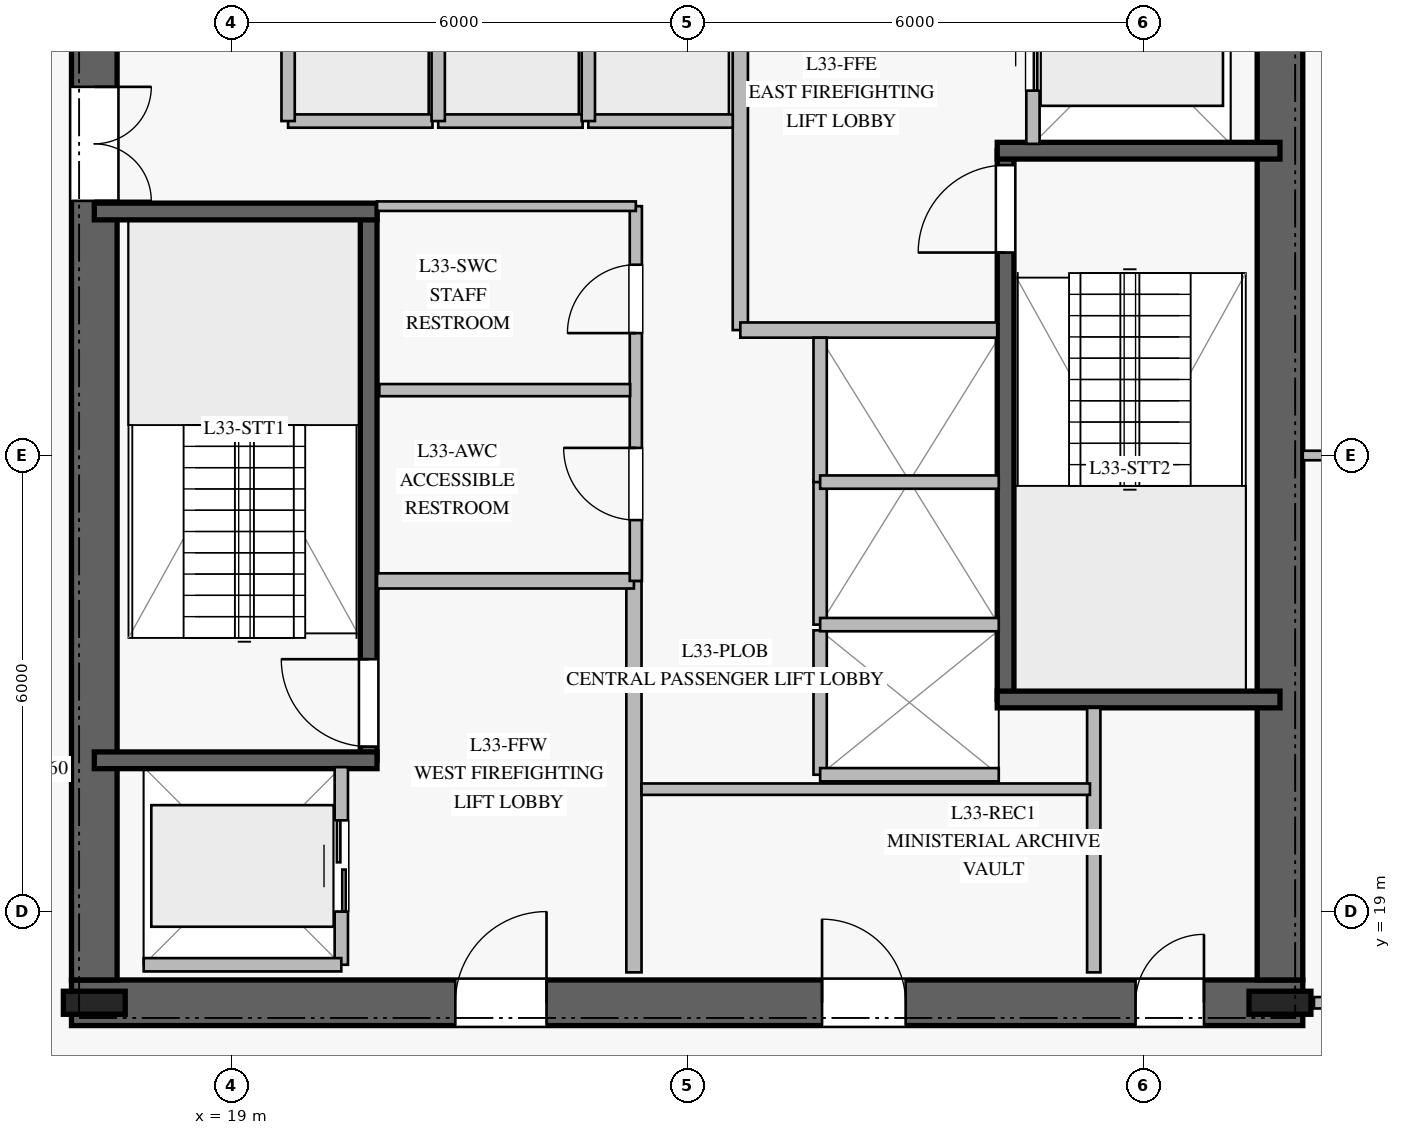
"""IFC4 building model, lengths in metres.
Left out: names, types, materials, properties, quantities, classifications, styles, units other than length and angle.
Written with IfcOpenShell. Run it as: python <this file> out.ifc"""

import sys

from ifc_helpers import new_model, si_unit, direction, frame, frame_2d, origin, origin_2d, place, context, subcontext, project, spatial, rectangle, i_section, extrude, element, fill, save


model = new_model("IFC4")
c1 = context("Model", 3, precision=1e-05, world=origin(), true_north=direction((0.0, 1.0)))
c2 = subcontext(c1, "Body", "Model", "MODEL_VIEW")
j1 = project(units=[si_unit("LENGTHUNIT", "METRE"), si_unit("PLANEANGLEUNIT", "RADIAN")], contexts=[c1])
p1 = place(None, origin())
s1 = spatial("IfcSite", under=j1, at=p1, CompositionType="ELEMENT")
p2 = place(p1, origin())
s2 = spatial("IfcBuilding", under=s1, at=p2, CompositionType="ELEMENT")
p3 = place(p2, frame((0.0, 0.0, 138.4)))
s3 = spatial("IfcBuildingStorey", under=s2, at=p3, CompositionType="ELEMENT", Elevation=138.4)
p4 = place(p3, frame((16.9, 17.8, 0.0), z_axis=(0.0, 0.0, 1.0), x_axis=(1.0, 0.0, 0.0)))
e1 = element("IfcWall", 1, at=p4, inside=s3, PredefinedType="SHEAR", context=c2, shape_type="SweptSolid", body=[
    extrude(rectangle(XDim=16.2, YDim=0.6, at=frame_2d((8.1, 0.0))), origin(), (0.0, 0.0, 1.0), 3.76),
])
p5 = place(p4, frame((5.05, 0.0, 0.0)))
e2 = element("IfcOpeningElement", 2, at=p5, cuts=e1, PredefinedType="OPENING", context=c2, shape_type="SweptSolid", body=[
    extrude(rectangle(XDim=1.2, YDim=2.25, at=frame_2d((0.6, 1.125))), frame((0.0, 0.31, 0.0), z_axis=(0.0, -1.0, 0.0), x_axis=(1.0, 0.0, 0.0)), (0.0, 0.0, 1.0), 0.62),
])
p6 = place(p4, frame((14.0, 0.0, 0.0)))
e3 = element("IfcOpeningElement", 3, at=p6, cuts=e1, PredefinedType="OPENING", context=c2, shape_type="SweptSolid", body=[
    extrude(rectangle(XDim=0.9, YDim=2.1, at=frame_2d((0.45, 1.05))), frame((0.0, 0.31, 0.0), z_axis=(0.0, -1.0, 0.0), x_axis=(1.0, 0.0, 0.0)), (0.0, 0.0, 1.0), 0.62),
])
p7 = place(p4, frame((9.875, 0.0, 0.0)))
e4 = element("IfcOpeningElement", 4, at=p7, cuts=e1, PredefinedType="OPENING", context=c2, shape_type="SweptSolid", body=[
    extrude(rectangle(XDim=1.1, YDim=2.2, at=frame_2d((0.55, 1.1))), frame((0.0, 0.31, 0.0), z_axis=(0.0, -1.0, 0.0), x_axis=(1.0, 0.0, 0.0)), (0.0, 0.0, 1.0), 0.62),
])
p8 = place(p3, frame((17.2, 31.9, 0.0), z_axis=(0.0, 0.0, 1.0), x_axis=(0.0, -1.0, 0.0)))
e5 = element("IfcWall", 5, at=p8, inside=s3, PredefinedType="SHEAR", context=c2, shape_type="SweptSolid", body=[
    extrude(rectangle(XDim=13.8, YDim=0.6, at=frame_2d((6.9, 0.0))), origin(), (0.0, 0.0, 1.0), 3.76),
])
p9 = place(p8, frame((2.05, 0.0, 0.0)))
e6 = element("IfcOpeningElement", 6, at=p9, cuts=e5, PredefinedType="OPENING", context=c2, shape_type="SweptSolid", body=[
    extrude(rectangle(XDim=1.5, YDim=2.2, at=frame_2d((0.75, 1.1))), frame((0.0, 0.31, 0.0), z_axis=(0.0, -1.0, 0.0), x_axis=(1.0, 0.0, 0.0)), (0.0, 0.0, 1.0), 0.62),
])
p10 = place(p3, frame((32.8, 18.1, 0.0), z_axis=(0.0, 0.0, 1.0), x_axis=(0.0, 1.0, 0.0)))
e7 = element("IfcWall", 7, at=p10, inside=s3, PredefinedType="SHEAR", context=c2, shape_type="SweptSolid", body=[
    extrude(rectangle(XDim=13.8, YDim=0.6, at=frame_2d((6.9, 0.0))), origin(), (0.0, 0.0, 1.0), 3.76),
])
for number, where, z_axis, x_axis in (
    (8, (17.2, 17.8, 0.0), (0.0, 0.0, 1.0), (1.0, 0.0, 0.0)),
    (9, (32.8, 17.8, 0.0), (0.0, 0.0, 1.0), (1.0, 0.0, 0.0)),
):
    element("IfcColumn", number, at=place(p3, frame(where, z_axis=z_axis, x_axis=x_axis)), inside=s3, PredefinedType="COLUMN", context=c2, shape_type="SweptSolid", body=[
        extrude(i_section(OverallWidth=0.303, OverallDepth=0.814, WebThickness=0.021, FlangeThickness=0.04, at=origin_2d()), origin(), (0.0, 0.0, 1.0), 4.0),
    ])
p11 = place(p3, frame((20.81, 20.99, 0.0), z_axis=(0.0, 0.0, 1.0), x_axis=(0.0, 1.0, 0.0)))
e10 = element("IfcWall", 10, at=p11, inside=s3, PredefinedType="SOLIDWALL", context=c2, shape_type="SweptSolid", body=[
    extrude(rectangle(XDim=7.22, YDim=0.22, at=frame_2d((3.61, 0.0))), origin(), (0.0, 0.0, 1.0), 3.76),
])
p12 = place(p11, frame((0.18, 0.0, 0.0)))
e11 = element("IfcOpeningElement", 11, at=p12, cuts=e10, PredefinedType="OPENING", context=c2, shape_type="SweptSolid", body=[
    extrude(rectangle(XDim=1.15, YDim=2.2, at=frame_2d((0.575, 1.1))), frame((0.0, 0.12, 0.0), z_axis=(0.0, -1.0, 0.0), x_axis=(1.0, 0.0, 0.0)), (0.0, 0.0, 1.0), 0.24),
])
for number, where, z_axis, x_axis in (
    (12, (17.2, 20.99, 0.0), (0.0, 0.0, 1.0), (1.0, 0.0, 0.0)),
    (13, (17.2, 28.21, 0.0), (0.0, 0.0, 1.0), (1.0, 0.0, 0.0)),
):
    element("IfcWall", number, at=place(p3, frame(where, z_axis=z_axis, x_axis=x_axis)), inside=s3, PredefinedType="SOLIDWALL", context=c2, shape_type="SweptSolid", body=[
        extrude(rectangle(XDim=3.72, YDim=0.22, at=frame_2d((1.86, 0.0))), origin(), (0.0, 0.0, 1.0), 3.76),
    ])
p13 = place(p3, frame((29.19, 21.79, 0.0), z_axis=(0.0, 0.0, 1.0), x_axis=(0.0, 1.0, 0.0)))
e14 = element("IfcWall", 14, at=p13, inside=s3, PredefinedType="SOLIDWALL", context=c2, shape_type="SweptSolid", body=[
    extrude(rectangle(XDim=7.22, YDim=0.22, at=frame_2d((3.61, 0.0))), origin(), (0.0, 0.0, 1.0), 3.76),
])
p14 = place(p13, frame((5.88, 0.0, 0.0)))
e15 = element("IfcOpeningElement", 15, at=p14, cuts=e14, PredefinedType="OPENING", context=c2, shape_type="SweptSolid", body=[
    extrude(rectangle(XDim=1.15, YDim=2.2, at=frame_2d((0.575, 1.1))), frame((0.0, 0.12, 0.0), z_axis=(0.0, -1.0, 0.0), x_axis=(1.0, 0.0, 0.0)), (0.0, 0.0, 1.0), 0.24),
])
for number, where, z_axis, x_axis in (
    (16, (29.08, 21.79, 0.0), (0.0, 0.0, 1.0), (1.0, 0.0, 0.0)),
    (17, (29.08, 29.01, 0.0), (0.0, 0.0, 1.0), (1.0, 0.0, 0.0)),
):
    element("IfcWall", number, at=place(p3, frame(where, z_axis=z_axis, x_axis=x_axis)), inside=s3, PredefinedType="SOLIDWALL", context=c2, shape_type="SweptSolid", body=[
        extrude(rectangle(XDim=3.72, YDim=0.22, at=frame_2d((1.86, 0.0))), origin(), (0.0, 0.0, 1.0), 3.76),
    ])
p15 = place(p3, frame((24.3, 18.2, 0.0), z_axis=(0.0, 0.0, 1.0), x_axis=(0.0, 1.0, 0.0)))
e18 = element("IfcWall", 18, at=p15, inside=s3, PredefinedType="PARTITIONING", context=c2, shape_type="SweptSolid", body=[
    extrude(rectangle(XDim=5.15, YDim=0.2, at=frame_2d((2.575, 0.0))), origin(), (0.0, 0.0, 1.0), 3.76),
])
p16 = place(p3, frame((20.92, 23.35, 0.0), z_axis=(0.0, 0.0, 1.0), x_axis=(1.0, 0.0, 0.0)))
e19 = element("IfcWall", 19, at=p16, inside=s3, PredefinedType="PARTITIONING", context=c2, shape_type="SweptSolid", body=[
    extrude(rectangle(XDim=3.38, YDim=0.2, at=frame_2d((1.69, 0.0))), origin(), (0.0, 0.0, 1.0), 3.76),
])
p17 = place(p3, frame((25.7, 26.65, 0.0), z_axis=(0.0, 0.0, 1.0), x_axis=(0.0, 1.0, 0.0)))
e20 = element("IfcWall", 20, at=p17, inside=s3, PredefinedType="PARTITIONING", context=c2, shape_type="SweptSolid", body=[
    extrude(rectangle(XDim=5.15, YDim=0.2, at=frame_2d((2.575, 0.0))), origin(), (0.0, 0.0, 1.0), 3.76),
])
p18 = place(p3, frame((25.7, 26.65, 0.0), z_axis=(0.0, 0.0, 1.0), x_axis=(1.0, 0.0, 0.0)))
e21 = element("IfcWall", 21, at=p18, inside=s3, PredefinedType="PARTITIONING", context=c2, shape_type="SweptSolid", body=[
    extrude(rectangle(XDim=3.38, YDim=0.2, at=frame_2d((1.69, 0.0))), origin(), (0.0, 0.0, 1.0), 3.76),
])
p19 = place(p3, frame((24.325, 23.35, 0.0), z_axis=(0.0, 0.0, 1.0), x_axis=(0.0, 1.0, 0.0)))
e22 = element("IfcWall", 22, at=p19, inside=s3, PredefinedType="PLUMBINGWALL", context=c2, shape_type="SweptSolid", body=[
    extrude(rectangle(XDim=4.93, YDim=0.16, at=frame_2d((2.465, 0.0))), origin(), (0.0, 0.0, 1.0), 3.76),
])
p20 = place(p19, frame((0.8, 0.0, 0.0)))
e23 = element("IfcOpeningElement", 23, at=p20, cuts=e22, PredefinedType="OPENING", context=c2, shape_type="SweptSolid", body=[
    extrude(rectangle(XDim=0.95, YDim=2.1, at=frame_2d((0.475, 1.05))), frame((0.0, 0.09, 0.0), z_axis=(0.0, -1.0, 0.0), x_axis=(1.0, 0.0, 0.0)), (0.0, 0.0, 1.0), 0.18),
])
p21 = place(p19, frame((3.26, 0.0, 0.0)))
e24 = element("IfcOpeningElement", 24, at=p21, cuts=e22, PredefinedType="OPENING", context=c2, shape_type="SweptSolid", body=[
    extrude(rectangle(XDim=0.9, YDim=2.1, at=frame_2d((0.45, 1.05))), frame((0.0, 0.09, 0.0), z_axis=(0.0, -1.0, 0.0), x_axis=(1.0, 0.0, 0.0)), (0.0, 0.0, 1.0), 0.18),
])
p22 = place(p3, frame((20.92, 28.28, 0.0), z_axis=(0.0, 0.0, 1.0), x_axis=(1.0, 0.0, 0.0)))
e25 = element("IfcWall", 25, at=p22, inside=s3, PredefinedType="PARTITIONING", context=c2, shape_type="SweptSolid", body=[
    extrude(rectangle(XDim=3.405, YDim=0.125, at=frame_2d((1.703, 0.0))), origin(), (0.0, 0.0, 1.0), 3.76),
])
p23 = place(p3, frame((20.95, 25.86, 0.0), z_axis=(0.0, 0.0, 1.0), x_axis=(1.0, 0.0, 0.0)))
e26 = element("IfcWall", 26, at=p23, inside=s3, PredefinedType="PLUMBINGWALL", context=c2, shape_type="SweptSolid", body=[
    extrude(rectangle(XDim=3.3, YDim=0.16, at=frame_2d((1.65, 0.0))), origin(), (0.0, 0.0, 1.0), 3.76),
])
p24 = place(p3, frame((30.35, 18.2, 0.0), z_axis=(0.0, 0.0, 1.0), x_axis=(0.0, 1.0, 0.0)))
e27 = element("IfcWall", 27, at=p24, inside=s3, PredefinedType="PARTITIONING", context=c2, shape_type="SweptSolid", body=[
    extrude(rectangle(XDim=3.48, YDim=0.175, at=frame_2d((1.74, 0.0))), origin(), (0.0, 0.0, 1.0), 3.76),
])
p25 = place(p3, frame((24.4, 20.61, 0.0), z_axis=(0.0, 0.0, 1.0), x_axis=(1.0, 0.0, 0.0)))
e28 = element("IfcWall", 28, at=p25, inside=s3, PredefinedType="PARTITIONING", context=c2, shape_type="SweptSolid", body=[
    extrude(rectangle(XDim=5.9, YDim=0.15, at=frame_2d((2.95, 0.0))), origin(), (0.0, 0.0, 1.0), 3.76),
])
p26 = place(p3, frame((19.75, 29.4, 0.0), z_axis=(0.0, 0.0, 1.0), x_axis=(1.0, 0.0, 0.0)))
e29 = element("IfcWall", 29, at=p26, inside=s3, PredefinedType="PARTITIONING", context=c2, shape_type="SweptSolid", body=[
    extrude(rectangle(XDim=1.9, YDim=0.175, at=frame_2d((0.95, 0.0))), origin(), (0.0, 0.0, 1.0), 3.76),
])
p27 = place(p3, frame((19.75, 29.4, 0.0), z_axis=(0.0, 0.0, 1.0), x_axis=(0.0, 1.0, 0.0)))
e30 = element("IfcWall", 30, at=p27, inside=s3, PredefinedType="PARTITIONING", context=c2, shape_type="SweptSolid", body=[
    extrude(rectangle(XDim=2.35, YDim=0.175, at=frame_2d((1.175, 0.0))), origin(), (0.0, 0.0, 1.0), 3.76),
])
p28 = place(p3, frame((21.725, 29.4, 0.0), z_axis=(0.0, 0.0, 1.0), x_axis=(1.0, 0.0, 0.0)))
e31 = element("IfcWall", 31, at=p28, inside=s3, PredefinedType="PARTITIONING", context=c2, shape_type="SweptSolid", body=[
    extrude(rectangle(XDim=1.9, YDim=0.175, at=frame_2d((0.95, 0.0))), origin(), (0.0, 0.0, 1.0), 3.76),
])
p29 = place(p3, frame((21.725, 29.4, 0.0), z_axis=(0.0, 0.0, 1.0), x_axis=(0.0, 1.0, 0.0)))
e32 = element("IfcWall", 32, at=p29, inside=s3, PredefinedType="PARTITIONING", context=c2, shape_type="SweptSolid", body=[
    extrude(rectangle(XDim=2.35, YDim=0.175, at=frame_2d((1.175, 0.0))), origin(), (0.0, 0.0, 1.0), 3.76),
])
p30 = place(p3, frame((23.7, 29.4, 0.0), z_axis=(0.0, 0.0, 1.0), x_axis=(1.0, 0.0, 0.0)))
e33 = element("IfcWall", 33, at=p30, inside=s3, PredefinedType="PARTITIONING", context=c2, shape_type="SweptSolid", body=[
    extrude(rectangle(XDim=1.9, YDim=0.175, at=frame_2d((0.95, 0.0))), origin(), (0.0, 0.0, 1.0), 3.76),
])
p31 = place(p3, frame((23.7, 29.4, 0.0), z_axis=(0.0, 0.0, 1.0), x_axis=(0.0, 1.0, 0.0)))
e34 = element("IfcWall", 34, at=p31, inside=s3, PredefinedType="PARTITIONING", context=c2, shape_type="SweptSolid", body=[
    extrude(rectangle(XDim=2.35, YDim=0.175, at=frame_2d((1.175, 0.0))), origin(), (0.0, 0.0, 1.0), 3.76),
])
p32 = place(p3, frame((26.75, 20.8, 0.0), z_axis=(0.0, 0.0, 1.0), x_axis=(0.0, 1.0, 0.0)))
e35 = element("IfcWall", 35, at=p32, inside=s3, PredefinedType="PARTITIONING", context=c2, shape_type="SweptSolid", body=[
    extrude(rectangle(XDim=1.9, YDim=0.175, at=frame_2d((0.95, 0.0))), origin(), (0.0, 0.0, 1.0), 3.76),
])
p33 = place(p3, frame((26.75, 20.8, 0.0), z_axis=(0.0, 0.0, 1.0), x_axis=(1.0, 0.0, 0.0)))
e36 = element("IfcWall", 36, at=p33, inside=s3, PredefinedType="PARTITIONING", context=c2, shape_type="SweptSolid", body=[
    extrude(rectangle(XDim=2.35, YDim=0.175, at=frame_2d((1.175, 0.0))), origin(), (0.0, 0.0, 1.0), 3.76),
])
p34 = place(p3, frame((26.75, 22.775, 0.0), z_axis=(0.0, 0.0, 1.0), x_axis=(0.0, 1.0, 0.0)))
e37 = element("IfcWall", 37, at=p34, inside=s3, PredefinedType="PARTITIONING", context=c2, shape_type="SweptSolid", body=[
    extrude(rectangle(XDim=1.9, YDim=0.175, at=frame_2d((0.95, 0.0))), origin(), (0.0, 0.0, 1.0), 3.76),
])
p35 = place(p3, frame((26.75, 22.775, 0.0), z_axis=(0.0, 0.0, 1.0), x_axis=(1.0, 0.0, 0.0)))
e38 = element("IfcWall", 38, at=p35, inside=s3, PredefinedType="PARTITIONING", context=c2, shape_type="SweptSolid", body=[
    extrude(rectangle(XDim=2.35, YDim=0.175, at=frame_2d((1.175, 0.0))), origin(), (0.0, 0.0, 1.0), 3.76),
])
p36 = place(p3, frame((26.75, 24.65, 0.0), z_axis=(0.0, 0.0, 1.0), x_axis=(0.0, 1.0, 0.0)))
e39 = element("IfcWall", 39, at=p36, inside=s3, PredefinedType="PARTITIONING", context=c2, shape_type="SweptSolid", body=[
    extrude(rectangle(XDim=1.9, YDim=0.175, at=frame_2d((0.95, 0.0))), origin(), (0.0, 0.0, 1.0), 3.76),
])
p37 = place(p3, frame((26.75, 24.65, 0.0), z_axis=(0.0, 0.0, 1.0), x_axis=(1.0, 0.0, 0.0)))
e40 = element("IfcWall", 40, at=p37, inside=s3, PredefinedType="PARTITIONING", context=c2, shape_type="SweptSolid", body=[
    extrude(rectangle(XDim=2.35, YDim=0.175, at=frame_2d((1.175, 0.0))), origin(), (0.0, 0.0, 1.0), 3.76),
])
p38 = place(p3, frame((20.45, 18.3, 0.0), z_axis=(0.0, 0.0, 1.0), x_axis=(0.0, 1.0, 0.0)))
e41 = element("IfcWall", 41, at=p38, inside=s3, PredefinedType="PARTITIONING", context=c2, shape_type="SweptSolid", body=[
    extrude(rectangle(XDim=2.6, YDim=0.175, at=frame_2d((1.3, 0.0))), origin(), (0.0, 0.0, 1.0), 3.76),
])
p39 = place(p38, frame((0.7, 0.0, 0.0)))
e42 = element("IfcOpeningElement", 42, at=p39, cuts=e41, PredefinedType="OPENING", context=c2, shape_type="SweptSolid", body=[
    extrude(rectangle(XDim=1.2, YDim=2.2, at=frame_2d((0.6, 1.1))), frame((0.0, 0.098, 0.0), z_axis=(0.0, -1.0, 0.0), x_axis=(1.0, 0.0, 0.0)), (0.0, 0.0, 1.0), 0.195),
])
p40 = place(p3, frame((17.85, 18.3, 0.0), z_axis=(0.0, 0.0, 1.0), x_axis=(1.0, 0.0, 0.0)))
e43 = element("IfcWall", 43, at=p40, inside=s3, PredefinedType="PARTITIONING", context=c2, shape_type="SweptSolid", body=[
    extrude(rectangle(XDim=2.6, YDim=0.175, at=frame_2d((1.3, 0.0))), origin(), (0.0, 0.0, 1.0), 3.76),
])
p41 = place(p3, frame((29.55, 29.1, 0.0), z_axis=(0.0, 0.0, 1.0), x_axis=(0.0, 1.0, 0.0)))
e44 = element("IfcWall", 44, at=p41, inside=s3, PredefinedType="PARTITIONING", context=c2, shape_type="SweptSolid", body=[
    extrude(rectangle(XDim=2.6, YDim=0.175, at=frame_2d((1.3, 0.0))), origin(), (0.0, 0.0, 1.0), 3.76),
])
p42 = place(p41, frame((0.7, 0.0, 0.0)))
e45 = element("IfcOpeningElement", 45, at=p42, cuts=e44, PredefinedType="OPENING", context=c2, shape_type="SweptSolid", body=[
    extrude(rectangle(XDim=1.2, YDim=2.2, at=frame_2d((0.6, 1.1))), frame((0.0, 0.098, 0.0), z_axis=(0.0, -1.0, 0.0), x_axis=(1.0, 0.0, 0.0)), (0.0, 0.0, 1.0), 0.195),
])
p43 = place(p3, frame((33.247, 17.8, 0.0), z_axis=(0.0, 0.0, 1.0), x_axis=(1.0, 0.0, 0.0)))
e46 = element("IfcWall", 46, at=p43, inside=s3, PredefinedType="PARTITIONING", context=c2, shape_type="SweptSolid", body=[
    extrude(rectangle(XDim=7.953, YDim=0.15, at=frame_2d((3.977, 0.0))), origin(), (0.0, 0.0, 1.0), 3.21),
])
p44 = place(p43, frame((3.338, 0.0, 0.0)))
e47 = element("IfcOpeningElement", 47, at=p44, cuts=e46, PredefinedType="OPENING", context=c2, shape_type="SweptSolid", body=[
    extrude(rectangle(XDim=1.1, YDim=2.2, at=frame_2d((0.55, 1.1))), frame((0.0, 0.085, 0.0), z_axis=(0.0, -1.0, 0.0), x_axis=(1.0, 0.0, 0.0)), (0.0, 0.0, 1.0), 0.17),
])
p45 = place(p3, frame((33.1, 25.0, 0.0), z_axis=(0.0, 0.0, 1.0), x_axis=(1.0, 0.0, 0.0)))
e48 = element("IfcWall", 48, at=p45, inside=s3, PredefinedType="PARTITIONING", context=c2, shape_type="SweptSolid", body=[
    extrude(rectangle(XDim=11.658, YDim=0.125, at=frame_2d((5.829, 0.0))), origin(), (0.0, 0.0, 1.0), 3.16),
])
p46 = place(p12, origin())
e49 = element("IfcDoor", 49, at=p46, inside=s3, OperationType="SINGLE_SWING_RIGHT", PredefinedType="DOOR", context=c2, shape_type="SweptSolid", body=[
    extrude(rectangle(XDim=1.15, YDim=2.2, at=frame_2d((0.575, 1.1))), frame((0.0, 0.025, 0.0), z_axis=(0.0, -1.0, 0.0), x_axis=(1.0, 0.0, 0.0)), (0.0, 0.0, 1.0), 0.05),
])
fill(e11, e49)
p47 = place(p14, origin())
e50 = element("IfcDoor", 50, at=p47, inside=s3, OperationType="SINGLE_SWING_LEFT", PredefinedType="DOOR", context=c2, shape_type="SweptSolid", body=[
    extrude(rectangle(XDim=1.15, YDim=2.2, at=frame_2d((0.575, 1.1))), frame((0.0, 0.025, 0.0), z_axis=(0.0, -1.0, 0.0), x_axis=(1.0, 0.0, 0.0)), (0.0, 0.0, 1.0), 0.05),
])
fill(e15, e50)
p48 = place(p5, origin())
e51 = element("IfcDoor", 51, at=p48, inside=s3, OperationType="SINGLE_SWING_RIGHT", PredefinedType="DOOR", context=c2, shape_type="SweptSolid", body=[
    extrude(rectangle(XDim=1.2, YDim=2.25, at=frame_2d((0.6, 1.125))), frame((0.0, 0.025, 0.0), z_axis=(0.0, -1.0, 0.0), x_axis=(1.0, 0.0, 0.0)), (0.0, 0.0, 1.0), 0.05),
])
fill(e2, e51)
p49 = place(p9, origin())
e52 = element("IfcDoor", 52, at=p49, inside=s3, OperationType="DOUBLE_DOOR_SINGLE_SWING", PredefinedType="DOOR", context=c2, shape_type="SweptSolid", body=[
    extrude(rectangle(XDim=1.5, YDim=2.2, at=frame_2d((0.75, 1.1))), frame((0.0, 0.025, 0.0), z_axis=(0.0, -1.0, 0.0), x_axis=(1.0, 0.0, 0.0)), (0.0, 0.0, 1.0), 0.05),
])
fill(e6, e52)
p50 = place(p20, origin())
e53 = element("IfcDoor", 53, at=p50, inside=s3, OperationType="SINGLE_SWING_RIGHT", PredefinedType="DOOR", context=c2, shape_type="SweptSolid", body=[
    extrude(rectangle(XDim=0.95, YDim=2.1, at=frame_2d((0.475, 1.05))), frame((0.0, 0.025, 0.0), z_axis=(0.0, -1.0, 0.0), x_axis=(1.0, 0.0, 0.0)), (0.0, 0.0, 1.0), 0.05),
])
fill(e23, e53)
p51 = place(p21, origin())
e54 = element("IfcDoor", 54, at=p51, inside=s3, OperationType="SINGLE_SWING_LEFT", PredefinedType="DOOR", context=c2, shape_type="SweptSolid", body=[
    extrude(rectangle(XDim=0.9, YDim=2.1, at=frame_2d((0.45, 1.05))), frame((0.0, 0.025, 0.0), z_axis=(0.0, -1.0, 0.0), x_axis=(1.0, 0.0, 0.0)), (0.0, 0.0, 1.0), 0.05),
])
fill(e24, e54)
p52 = place(p6, origin())
e55 = element("IfcDoor", 55, at=p52, inside=s3, OperationType="SINGLE_SWING_RIGHT", PredefinedType="DOOR", context=c2, shape_type="SweptSolid", body=[
    extrude(rectangle(XDim=0.9, YDim=2.1, at=frame_2d((0.45, 1.05))), frame((0.0, 0.025, 0.0), z_axis=(0.0, -1.0, 0.0), x_axis=(1.0, 0.0, 0.0)), (0.0, 0.0, 1.0), 0.05),
])
fill(e3, e55)
p53 = place(p7, origin())
e56 = element("IfcDoor", 56, at=p53, inside=s3, OperationType="SINGLE_SWING_LEFT", PredefinedType="DOOR", context=c2, shape_type="SweptSolid", body=[
    extrude(rectangle(XDim=1.1, YDim=2.2, at=frame_2d((0.55, 1.1))), frame((0.0, 0.025, 0.0), z_axis=(0.0, -1.0, 0.0), x_axis=(1.0, 0.0, 0.0)), (0.0, 0.0, 1.0), 0.05),
])
fill(e4, e56)
p54 = place(p39, origin())
e57 = element("IfcDoor", 57, at=p54, inside=s3, OperationType="DOUBLE_DOOR_SLIDING", PredefinedType="DOOR", context=c2, shape_type="SweptSolid", body=[
    extrude(rectangle(XDim=1.2, YDim=2.2, at=frame_2d((0.6, 1.1))), frame((0.0, 0.025, 0.0), z_axis=(0.0, -1.0, 0.0), x_axis=(1.0, 0.0, 0.0)), (0.0, 0.0, 1.0), 0.05),
])
fill(e42, e57)
p55 = place(p42, origin())
e58 = element("IfcDoor", 58, at=p55, inside=s3, OperationType="DOUBLE_DOOR_SLIDING", PredefinedType="DOOR", context=c2, shape_type="SweptSolid", body=[
    extrude(rectangle(XDim=1.2, YDim=2.2, at=frame_2d((0.6, 1.1))), frame((0.0, 0.025, 0.0), z_axis=(0.0, -1.0, 0.0), x_axis=(1.0, 0.0, 0.0)), (0.0, 0.0, 1.0), 0.05),
])
fill(e45, e58)
save(model, sys.argv[1])
